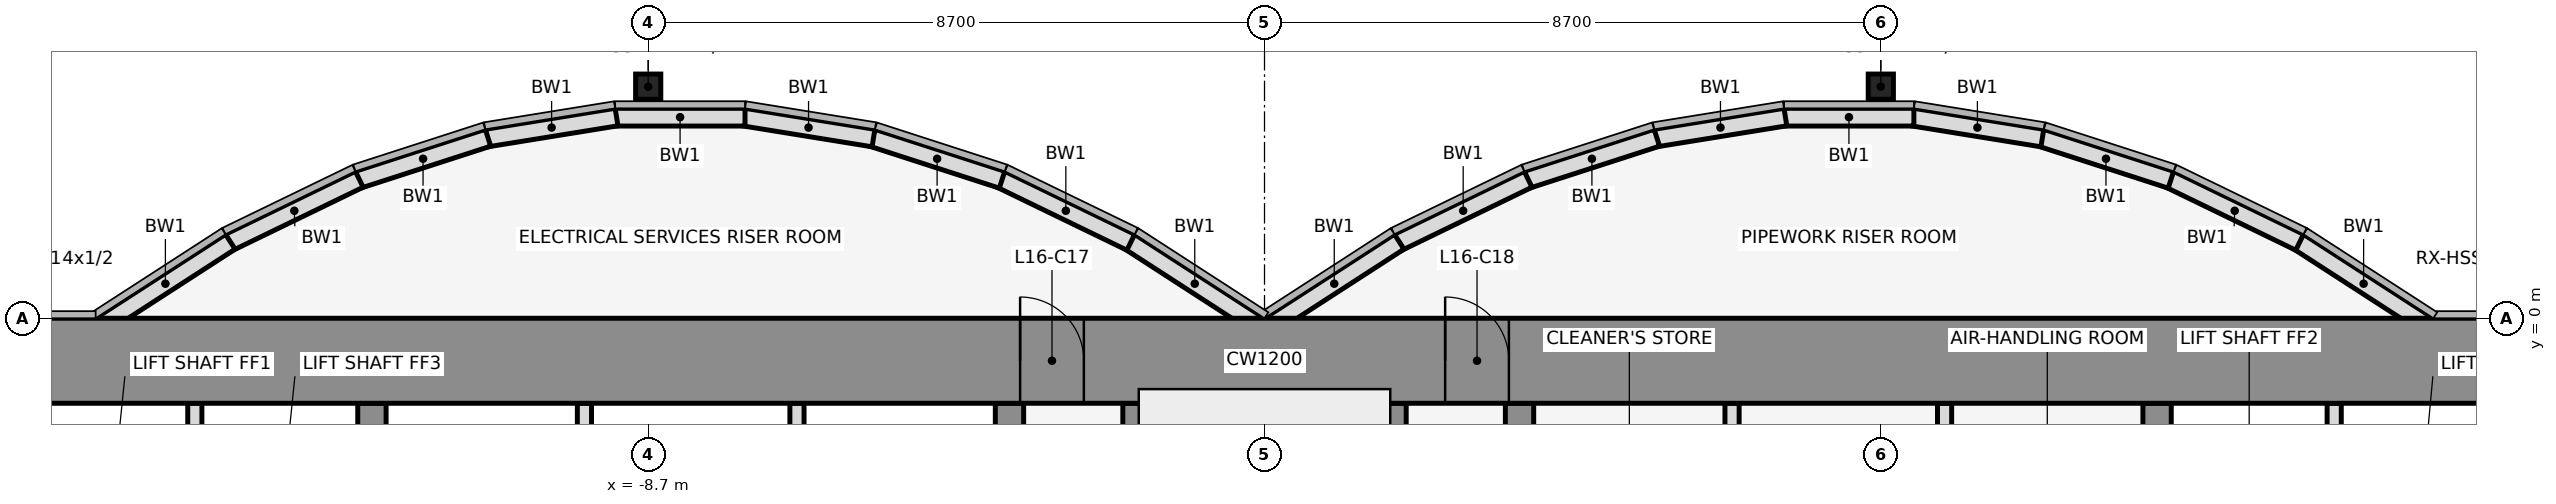
"""IFC4 building model, lengths in metres.
Left out: names, types, materials, properties, quantities, classifications, styles, units other than length and angle.
Written with IfcOpenShell. Run it as: python <this file> out.ifc"""

import sys

from ifc_helpers import new_model, si_unit, direction, frame, frame_2d, origin, origin_2d, place, context, subcontext, project, spatial, rectangle, hollow_rectangle, extrude, element, fill, save


model = new_model("IFC4")
c1 = context("Model", 3, precision=1e-05, world=origin(), true_north=direction((0.0, 1.0)))
c2 = subcontext(c1, "Body", "Model", "MODEL_VIEW")
j1 = project(units=[si_unit("LENGTHUNIT", "METRE"), si_unit("PLANEANGLEUNIT", "RADIAN")], contexts=[c1])
p1 = place(None, origin())
s1 = spatial("IfcSite", under=j1, at=p1, CompositionType="ELEMENT")
p2 = place(p1, origin())
s2 = spatial("IfcBuilding", under=s1, at=p2, CompositionType="ELEMENT")
p3 = place(p2, frame((0.0, 0.0, 80.0)))
s3 = spatial("IfcBuildingStorey", under=s2, at=p3, CompositionType="ELEMENT", Elevation=80.0)
for number, where, z_axis, x_axis in (
    (1, (-8.7, 3.269, 0.0), (0.0, 0.0, 1.0), (1.0, 0.0, 0.0)),
    (2, (8.7, 3.269, 0.0), (0.0, 0.0, 1.0), (1.0, 0.0, 0.0)),
):
    element("IfcColumn", number, at=place(p3, frame(where, z_axis=z_axis, x_axis=x_axis)), inside=s3, PredefinedType="COLUMN", context=c2, shape_type="SweptSolid", body=[
        extrude(hollow_rectangle(XDim=0.356, YDim=0.356, WallThickness=0.012, at=origin_2d()), origin(), (0.0, 0.0, 1.0), 4.5),
    ])
p4 = place(p3, frame((16.432, -0.105, 0.0), z_axis=(0.0, 0.0, 1.0), x_axis=(-0.83981312244, 0.542875602121, 0.0)))
e3 = element("IfcWall", 3, at=p4, inside=s3, PredefinedType="STANDARD", context=c2, shape_type="SweptSolid", body=[
    extrude(rectangle(XDim=2.183, YDim=0.25, at=frame_2d((1.091, 0.0))), origin(), (0.0, 0.0, 1.0), 4.3),
])
p5 = place(p3, frame((14.612, 1.073, 0.0), z_axis=(0.0, 0.0, 1.0), x_axis=(-0.89982408427, 0.436252928206, 0.0)))
e4 = element("IfcWall", 4, at=p5, inside=s3, PredefinedType="STANDARD", context=c2, shape_type="SweptSolid", body=[
    extrude(rectangle(XDim=2.038, YDim=0.25, at=frame_2d((1.019, 0.0))), origin(), (0.0, 0.0, 1.0), 4.3),
])
p6 = place(p3, frame((12.795, 1.955, 0.0), z_axis=(0.0, 0.0, 1.0), x_axis=(-0.951495806175, 0.307661714928, 0.0)))
e5 = element("IfcWall", 5, at=p6, inside=s3, PredefinedType="STANDARD", context=c2, shape_type="SweptSolid", body=[
    extrude(rectangle(XDim=1.927, YDim=0.25, at=frame_2d((0.963, 0.0))), origin(), (0.0, 0.0, 1.0), 4.3),
])
p7 = place(p3, frame((10.98, 2.543, 0.0), z_axis=(0.0, 0.0, 1.0), x_axis=(-0.987181718931, 0.159600293885, 0.0)))
e6 = element("IfcWall", 6, at=p7, inside=s3, PredefinedType="STANDARD", context=c2, shape_type="SweptSolid", body=[
    extrude(rectangle(XDim=1.857, YDim=0.25, at=frame_2d((0.929, 0.0))), origin(), (0.0, 0.0, 1.0), 4.3),
])
p8 = place(p3, frame((9.167, 2.838, 0.0), z_axis=(0.0, 0.0, 1.0), x_axis=(-1.0, 0.0, 0.0)))
e7 = element("IfcWall", 7, at=p8, inside=s3, PredefinedType="STANDARD", context=c2, shape_type="SweptSolid", body=[
    extrude(rectangle(XDim=1.833, YDim=0.25, at=frame_2d((0.917, 0.0))), origin(), (0.0, 0.0, 1.0), 4.3),
])
p9 = place(p3, frame((7.353, 2.84, 0.0), z_axis=(0.0, 0.0, 1.0), x_axis=(-0.987181718931, -0.159600293885, 0.0)))
e8 = element("IfcWall", 8, at=p9, inside=s3, PredefinedType="STANDARD", context=c2, shape_type="SweptSolid", body=[
    extrude(rectangle(XDim=1.857, YDim=0.25, at=frame_2d((0.929, 0.0))), origin(), (0.0, 0.0, 1.0), 4.3),
])
p10 = place(p3, frame((5.538, 2.548, 0.0), z_axis=(0.0, 0.0, 1.0), x_axis=(-0.951495806175, -0.307661714928, 0.0)))
e9 = element("IfcWall", 9, at=p10, inside=s3, PredefinedType="STANDARD", context=c2, shape_type="SweptSolid", body=[
    extrude(rectangle(XDim=1.927, YDim=0.25, at=frame_2d((0.963, 0.0))), origin(), (0.0, 0.0, 1.0), 4.3),
])
p11 = place(p3, frame((3.721, 1.962, 0.0), z_axis=(0.0, 0.0, 1.0), x_axis=(-0.89982408427, -0.436252928206, 0.0)))
e10 = element("IfcWall", 10, at=p11, inside=s3, PredefinedType="STANDARD", context=c2, shape_type="SweptSolid", body=[
    extrude(rectangle(XDim=2.038, YDim=0.25, at=frame_2d((1.019, 0.0))), origin(), (0.0, 0.0, 1.0), 4.3),
])
for number, where, z_axis, x_axis in (
    (11, (1.901, 1.08, 0.0), (0.0, 0.0, 1.0), (-0.84, -0.543, 0.0)),
    (12, (-0.068, -0.105, 0.0), (0.0, 0.0, 1.0), (-0.84, 0.543, 0.0)),
):
    element("IfcWall", number, at=place(p3, frame(where, z_axis=z_axis, x_axis=x_axis)), inside=s3, PredefinedType="STANDARD", context=c2, shape_type="SweptSolid", body=[
        extrude(rectangle(XDim=2.183, YDim=0.25, at=frame_2d((1.091, 0.0))), origin(), (0.0, 0.0, 1.0), 4.3),
    ])
p12 = place(p3, frame((-1.888, 1.073, 0.0), z_axis=(0.0, 0.0, 1.0), x_axis=(-0.89982408427, 0.436252928206, 0.0)))
e13 = element("IfcWall", 13, at=p12, inside=s3, PredefinedType="STANDARD", context=c2, shape_type="SweptSolid", body=[
    extrude(rectangle(XDim=2.038, YDim=0.25, at=frame_2d((1.019, 0.0))), origin(), (0.0, 0.0, 1.0), 4.3),
])
p13 = place(p3, frame((-3.705, 1.955, 0.0), z_axis=(0.0, 0.0, 1.0), x_axis=(-0.951495806175, 0.307661714928, 0.0)))
e14 = element("IfcWall", 14, at=p13, inside=s3, PredefinedType="STANDARD", context=c2, shape_type="SweptSolid", body=[
    extrude(rectangle(XDim=1.927, YDim=0.25, at=frame_2d((0.963, 0.0))), origin(), (0.0, 0.0, 1.0), 4.3),
])
p14 = place(p3, frame((-5.52, 2.543, 0.0), z_axis=(0.0, 0.0, 1.0), x_axis=(-0.987181718931, 0.159600293885, 0.0)))
e15 = element("IfcWall", 15, at=p14, inside=s3, PredefinedType="STANDARD", context=c2, shape_type="SweptSolid", body=[
    extrude(rectangle(XDim=1.857, YDim=0.25, at=frame_2d((0.929, 0.0))), origin(), (0.0, 0.0, 1.0), 4.3),
])
p15 = place(p3, frame((-7.333, 2.838, 0.0), z_axis=(0.0, 0.0, 1.0), x_axis=(-1.0, 0.0, 0.0)))
e16 = element("IfcWall", 16, at=p15, inside=s3, PredefinedType="STANDARD", context=c2, shape_type="SweptSolid", body=[
    extrude(rectangle(XDim=1.833, YDim=0.25, at=frame_2d((0.917, 0.0))), origin(), (0.0, 0.0, 1.0), 4.3),
])
p16 = place(p3, frame((-9.147, 2.84, 0.0), z_axis=(0.0, 0.0, 1.0), x_axis=(-0.987181718931, -0.159600293885, 0.0)))
e17 = element("IfcWall", 17, at=p16, inside=s3, PredefinedType="STANDARD", context=c2, shape_type="SweptSolid", body=[
    extrude(rectangle(XDim=1.857, YDim=0.25, at=frame_2d((0.929, 0.0))), origin(), (0.0, 0.0, 1.0), 4.3),
])
p17 = place(p3, frame((-10.962, 2.548, 0.0), z_axis=(0.0, 0.0, 1.0), x_axis=(-0.951495806175, -0.307661714928, 0.0)))
e18 = element("IfcWall", 18, at=p17, inside=s3, PredefinedType="STANDARD", context=c2, shape_type="SweptSolid", body=[
    extrude(rectangle(XDim=1.927, YDim=0.25, at=frame_2d((0.963, 0.0))), origin(), (0.0, 0.0, 1.0), 4.3),
])
p18 = place(p3, frame((-12.779, 1.962, 0.0), z_axis=(0.0, 0.0, 1.0), x_axis=(-0.89982408427, -0.436252928206, 0.0)))
e19 = element("IfcWall", 19, at=p18, inside=s3, PredefinedType="STANDARD", context=c2, shape_type="SweptSolid", body=[
    extrude(rectangle(XDim=2.038, YDim=0.25, at=frame_2d((1.019, 0.0))), origin(), (0.0, 0.0, 1.0), 4.3),
])
p19 = place(p3, frame((-14.599, 1.08, 0.0), z_axis=(0.0, 0.0, 1.0), x_axis=(-0.83981312244, -0.542875602121, 0.0)))
e20 = element("IfcWall", 20, at=p19, inside=s3, PredefinedType="STANDARD", context=c2, shape_type="SweptSolid", body=[
    extrude(rectangle(XDim=2.183, YDim=0.25, at=frame_2d((1.091, 0.0))), origin(), (0.0, 0.0, 1.0), 4.3),
])
p20 = place(p3, frame((-15.1, -4.6, 0.0), z_axis=(0.0, 0.0, 1.0), x_axis=(0.0, 1.0, 0.0)))
e21 = element("IfcWall", 21, at=p20, inside=s3, PredefinedType="PARTITIONING", context=c2, shape_type="SweptSolid", body=[
    extrude(rectangle(XDim=3.4, YDim=0.2, at=frame_2d((1.7, 0.0))), origin(), (0.0, 0.0, 1.0), 3.368),
])
p21 = place(p3, frame((-12.6, -11.8, 0.0), z_axis=(0.0, 0.0, 1.0), x_axis=(0.0, 1.0, 0.0)))
e22 = element("IfcWall", 22, at=p21, inside=s3, PredefinedType="SHEAR", context=c2, shape_type="SweptSolid", body=[
    extrude(rectangle(XDim=10.6, YDim=0.4, at=frame_2d((5.3, 0.0))), origin(), (0.0, 0.0, 1.0), 4.5),
])
p22 = place(p21, frame((4.75, 0.0, 0.0)))
e23 = element("IfcOpeningElement", 23, at=p22, cuts=e22, PredefinedType="OPENING", context=c2, shape_type="SweptSolid", body=[
    extrude(rectangle(XDim=1.1, YDim=2.1, at=frame_2d((0.55, 1.05))), frame((0.0, 0.212, 0.0), z_axis=(0.0, -1.0, 0.0), x_axis=(1.0, 0.0, 0.0)), (0.0, 0.0, 1.0), 0.424),
])
for number, where, z_axis, x_axis in (
    (24, (-9.6, -4.6, 0.0), (0.0, 0.0, 1.0), (0.0, 1.0, 0.0)),
    (25, (-6.6, -4.6, 0.0), (0.0, 0.0, 1.0), (0.0, 1.0, 0.0)),
):
    element("IfcWall", number, at=place(p3, frame(where, z_axis=z_axis, x_axis=x_axis)), inside=s3, PredefinedType="PARTITIONING", context=c2, shape_type="SweptSolid", body=[
        extrude(rectangle(XDim=3.4, YDim=0.2, at=frame_2d((1.7, 0.0))), origin(), (0.0, 0.0, 1.0), 3.368),
    ])
p23 = place(p3, frame((-3.6, -11.8, 0.0), z_axis=(0.0, 0.0, 1.0), x_axis=(0.0, 1.0, 0.0)))
e26 = element("IfcWall", 26, at=p23, inside=s3, PredefinedType="SHEAR", context=c2, shape_type="SweptSolid", body=[
    extrude(rectangle(XDim=10.6, YDim=0.4, at=frame_2d((5.3, 0.0))), origin(), (0.0, 0.0, 1.0), 4.5),
])
p24 = place(p23, frame((4.85, 0.0, 0.0)))
e27 = element("IfcOpeningElement", 27, at=p24, cuts=e26, PredefinedType="OPENING", context=c2, shape_type="SweptSolid", body=[
    extrude(rectangle(XDim=0.9, YDim=2.1, at=frame_2d((0.45, 1.05))), frame((0.0, 0.212, 0.0), z_axis=(0.0, -1.0, 0.0), x_axis=(1.0, 0.0, 0.0)), (0.0, 0.0, 1.0), 0.424),
])
for number, where, z_axis, x_axis in (
    (28, (-1.8, -11.8, 0.0), (0.0, 0.0, 1.0), (0.0, 1.0, 0.0)),
    (29, (1.8, -11.8, 0.0), (0.0, 0.0, 1.0), (0.0, 1.0, 0.0)),
):
    element("IfcWall", number, at=place(p3, frame(where, z_axis=z_axis, x_axis=x_axis)), inside=s3, PredefinedType="SHEAR", context=c2, shape_type="SweptSolid", body=[
        extrude(rectangle(XDim=10.6, YDim=0.4, at=frame_2d((5.3, 0.0))), origin(), (0.0, 0.0, 1.0), 4.5),
    ])
p25 = place(p3, frame((3.6, -11.8, 0.0), z_axis=(0.0, 0.0, 1.0), x_axis=(0.0, 1.0, 0.0)))
e30 = element("IfcWall", 30, at=p25, inside=s3, PredefinedType="SHEAR", context=c2, shape_type="SweptSolid", body=[
    extrude(rectangle(XDim=10.6, YDim=0.4, at=frame_2d((5.3, 0.0))), origin(), (0.0, 0.0, 1.0), 4.5),
])
p26 = place(p25, frame((1.35, 0.0, 0.0)))
e31 = element("IfcOpeningElement", 31, at=p26, cuts=e30, PredefinedType="OPENING", context=c2, shape_type="SweptSolid", body=[
    extrude(rectangle(XDim=0.9, YDim=2.1, at=frame_2d((0.45, 1.05))), frame((0.0, 0.212, 0.0), z_axis=(0.0, -1.0, 0.0), x_axis=(1.0, 0.0, 0.0)), (0.0, 0.0, 1.0), 0.424),
])
for number, where, z_axis, x_axis in (
    (32, (6.6, -4.6, 0.0), (0.0, 0.0, 1.0), (0.0, 1.0, 0.0)),
    (33, (9.6, -4.6, 0.0), (0.0, 0.0, 1.0), (0.0, 1.0, 0.0)),
):
    element("IfcWall", number, at=place(p3, frame(where, z_axis=z_axis, x_axis=x_axis)), inside=s3, PredefinedType="PARTITIONING", context=c2, shape_type="SweptSolid", body=[
        extrude(rectangle(XDim=3.4, YDim=0.2, at=frame_2d((1.7, 0.0))), origin(), (0.0, 0.0, 1.0), 3.368),
    ])
p27 = place(p3, frame((12.6, -11.8, 0.0), z_axis=(0.0, 0.0, 1.0), x_axis=(0.0, 1.0, 0.0)))
e34 = element("IfcWall", 34, at=p27, inside=s3, PredefinedType="SHEAR", context=c2, shape_type="SweptSolid", body=[
    extrude(rectangle(XDim=10.6, YDim=0.4, at=frame_2d((5.3, 0.0))), origin(), (0.0, 0.0, 1.0), 4.5),
])
p28 = place(p27, frame((4.75, 0.0, 0.0)))
e35 = element("IfcOpeningElement", 35, at=p28, cuts=e34, PredefinedType="OPENING", context=c2, shape_type="SweptSolid", body=[
    extrude(rectangle(XDim=1.1, YDim=2.1, at=frame_2d((0.55, 1.05))), frame((0.0, 0.212, 0.0), z_axis=(0.0, -1.0, 0.0), x_axis=(1.0, 0.0, 0.0)), (0.0, 0.0, 1.0), 0.424),
])
p29 = place(p3, frame((15.1, -4.6, 0.0), z_axis=(0.0, 0.0, 1.0), x_axis=(0.0, 1.0, 0.0)))
e36 = element("IfcWall", 36, at=p29, inside=s3, PredefinedType="PARTITIONING", context=c2, shape_type="SweptSolid", body=[
    extrude(rectangle(XDim=3.4, YDim=0.2, at=frame_2d((1.7, 0.0))), origin(), (0.0, 0.0, 1.0), 3.368),
])
p30 = place(p3, frame((-22.0, -0.6, 0.0), z_axis=(0.0, 0.0, 1.0), x_axis=(1.0, 0.0, 0.0)))
e37 = element("IfcWall", 37, at=p30, inside=s3, PredefinedType="SHEAR", context=c2, shape_type="SweptSolid", body=[
    extrude(rectangle(XDim=44.0, YDim=1.2, at=frame_2d((22.0, 0.0))), origin(), (0.0, 0.0, 1.0), 4.5),
])
p31 = place(p30, frame((18.55, 0.0, 0.0)))
e38 = element("IfcOpeningElement", 38, at=p31, cuts=e37, PredefinedType="OPENING", context=c2, shape_type="SweptSolid", body=[
    extrude(rectangle(XDim=0.9, YDim=2.1, at=frame_2d((0.45, 1.05))), frame((0.0, 0.612, 0.0), z_axis=(0.0, -1.0, 0.0), x_axis=(1.0, 0.0, 0.0)), (0.0, 0.0, 1.0), 1.224),
])
p32 = place(p30, frame((24.55, 0.0, 0.0)))
e39 = element("IfcOpeningElement", 39, at=p32, cuts=e37, PredefinedType="OPENING", context=c2, shape_type="SweptSolid", body=[
    extrude(rectangle(XDim=0.9, YDim=2.1, at=frame_2d((0.45, 1.05))), frame((0.0, 0.612, 0.0), z_axis=(0.0, -1.0, 0.0), x_axis=(1.0, 0.0, 0.0)), (0.0, 0.0, 1.0), 1.224),
])
p33 = place(p31, origin())
e40 = element("IfcDoor", 40, at=p33, inside=s3, OperationType="SINGLE_SWING_LEFT", PredefinedType="DOOR", context=c2, shape_type="SweptSolid", body=[
    extrude(rectangle(XDim=0.9, YDim=2.1, at=frame_2d((0.45, 1.05))), frame((0.0, 0.025, 0.0), z_axis=(0.0, -1.0, 0.0), x_axis=(1.0, 0.0, 0.0)), (0.0, 0.0, 1.0), 0.05),
])
fill(e38, e40)
p34 = place(p32, origin())
e41 = element("IfcDoor", 41, at=p34, inside=s3, OperationType="SINGLE_SWING_LEFT", PredefinedType="DOOR", context=c2, shape_type="SweptSolid", body=[
    extrude(rectangle(XDim=0.9, YDim=2.1, at=frame_2d((0.45, 1.05))), frame((0.0, 0.025, 0.0), z_axis=(0.0, -1.0, 0.0), x_axis=(1.0, 0.0, 0.0)), (0.0, 0.0, 1.0), 0.05),
])
fill(e39, e41)
save(model, sys.argv[1])
